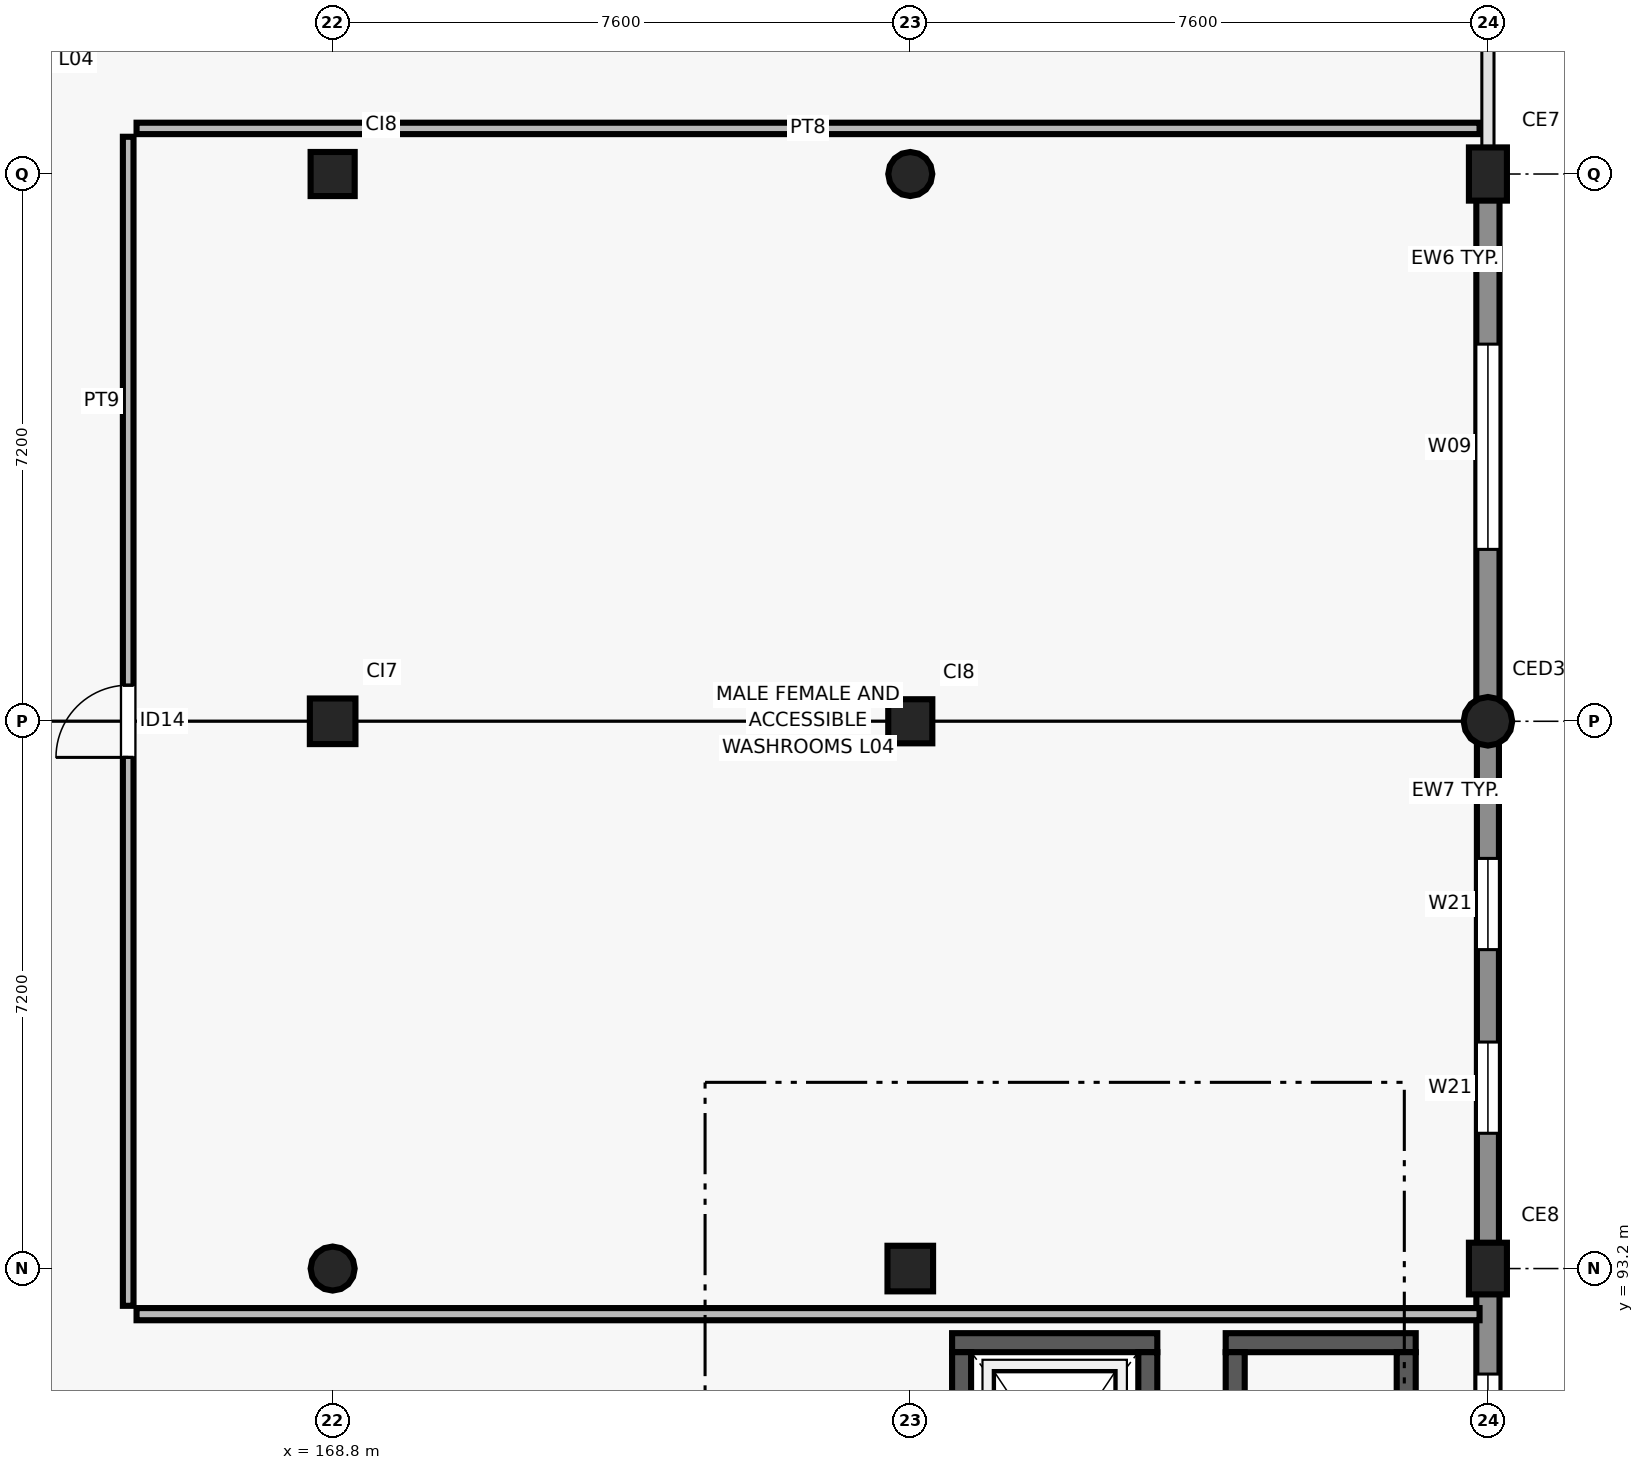
"""IFC4 building model, lengths in metres.
Left out: names, types, materials, properties, quantities, classifications, styles, units other than length and angle.
Written with IfcOpenShell. Run it as: python <this file> out.ifc"""

import sys

from ifc_helpers import new_model, si_unit, direction, frame, frame_2d, origin, origin_2d, place, context, subcontext, project, spatial, rectangle, circle, extrude, element, fill, save


model = new_model("IFC4")
c1 = context("Model", 3, precision=1e-05, world=origin(), true_north=direction((0.0, 1.0)))
c2 = subcontext(c1, "Body", "Model", "MODEL_VIEW")
j1 = project(units=[si_unit("LENGTHUNIT", "METRE"), si_unit("PLANEANGLEUNIT", "RADIAN")], contexts=[c1])
p1 = place(None, origin())
s1 = spatial("IfcSite", under=j1, at=p1, CompositionType="ELEMENT")
p2 = place(p1, origin())
s2 = spatial("IfcBuilding", under=s1, at=p2, CompositionType="ELEMENT")
p3 = place(p2, frame((0.0, 0.0, 17.4)))
s3 = spatial("IfcBuildingStorey", under=s2, at=p3, CompositionType="ELEMENT", Elevation=17.4)
p4 = place(p3, frame((168.8, 93.2, 0.0), z_axis=(0.0, 0.0, 1.0), x_axis=(1.0, 0.0, 0.0)))
e1 = element("IfcColumn", 1, at=p4, inside=s3, PredefinedType="COLUMN", context=c2, shape_type="SweptSolid", body=[
    extrude(circle(Radius=0.29, at=origin_2d()), origin(), (0.0, 0.0, 1.0), 4.2),
])
p5 = place(p3, frame((168.8, 100.4, 0.0), z_axis=(0.0, 0.0, 1.0), x_axis=(1.0, 0.0, 0.0)))
e2 = element("IfcColumn", 2, at=p5, inside=s3, PredefinedType="COLUMN", context=c2, shape_type="SweptSolid", body=[
    extrude(rectangle(XDim=0.6, YDim=0.6, at=origin_2d()), origin(), (0.0, 0.0, 1.0), 4.2),
])
p6 = place(p3, frame((168.8, 107.6, 0.0), z_axis=(0.0, 0.0, 1.0), x_axis=(1.0, 0.0, 0.0)))
e3 = element("IfcColumn", 3, at=p6, inside=s3, PredefinedType="COLUMN", context=c2, shape_type="SweptSolid", body=[
    extrude(rectangle(XDim=0.58, YDim=0.58, at=origin_2d()), origin(), (0.0, 0.0, 1.0), 4.2),
])
p7 = place(p3, frame((176.4, 93.2, 0.0), z_axis=(0.0, 0.0, 1.0), x_axis=(1.0, 0.0, 0.0)))
e4 = element("IfcColumn", 4, at=p7, inside=s3, PredefinedType="COLUMN", context=c2, shape_type="SweptSolid", body=[
    extrude(rectangle(XDim=0.6, YDim=0.6, at=origin_2d()), origin(), (0.0, 0.0, 1.0), 4.2),
])
p8 = place(p3, frame((176.4, 100.4, 0.0), z_axis=(0.0, 0.0, 1.0), x_axis=(1.0, 0.0, 0.0)))
e5 = element("IfcColumn", 5, at=p8, inside=s3, PredefinedType="COLUMN", context=c2, shape_type="SweptSolid", body=[
    extrude(rectangle(XDim=0.58, YDim=0.58, at=origin_2d()), origin(), (0.0, 0.0, 1.0), 4.2),
])
p9 = place(p3, frame((176.4, 107.6, 0.0), z_axis=(0.0, 0.0, 1.0), x_axis=(1.0, 0.0, 0.0)))
e6 = element("IfcColumn", 6, at=p9, inside=s3, PredefinedType="COLUMN", context=c2, shape_type="SweptSolid", body=[
    extrude(circle(Radius=0.29, at=origin_2d()), origin(), (0.0, 0.0, 1.0), 4.2),
])
p10 = place(p3, frame((184.0, 93.2, 0.0), z_axis=(0.0, 0.0, 1.0), x_axis=(1.0, 0.0, 0.0)))
e7 = element("IfcColumn", 7, at=p10, inside=s3, PredefinedType="COLUMN", context=c2, shape_type="SweptSolid", body=[
    extrude(rectangle(XDim=0.68, YDim=0.5, at=origin_2d()), origin(), (0.0, 0.0, 1.0), 4.2),
])
p11 = place(p3, frame((184.0, 100.4, 0.0), z_axis=(0.0, 0.0, 1.0), x_axis=(1.0, 0.0, 0.0)))
e8 = element("IfcColumn", 8, at=p11, inside=s3, PredefinedType="COLUMN", context=c2, shape_type="SweptSolid", body=[
    extrude(circle(Radius=0.32, at=origin_2d()), origin(), (0.0, 0.0, 1.0), 4.2),
])
p12 = place(p3, frame((184.0, 107.6, 0.0), z_axis=(0.0, 0.0, 1.0), x_axis=(1.0, 0.0, 0.0)))
e9 = element("IfcColumn", 9, at=p12, inside=s3, PredefinedType="COLUMN", context=c2, shape_type="SweptSolid", body=[
    extrude(rectangle(XDim=0.7, YDim=0.5, at=origin_2d()), origin(), (0.0, 0.0, 1.0), 4.2),
])
p13 = place(p3, frame((184.0, 100.669, 0.0), z_axis=(0.0, 0.0, 1.0), x_axis=(0.0, 1.0, 0.0)))
e10 = element("IfcWall", 10, at=p13, inside=s3, PredefinedType="SOLIDWALL", context=c2, shape_type="SweptSolid", body=[
    extrude(rectangle(XDim=6.686, YDim=0.305, at=frame_2d((3.343, 0.0))), origin(), (0.0, 0.0, 1.0), 3.53),
])
p14 = place(p13, frame((1.993, 0.0, 0.9)))
e11 = element("IfcOpeningElement", 11, at=p14, cuts=e10, PredefinedType="OPENING", context=c2, shape_type="SweptSolid", body=[
    extrude(rectangle(XDim=2.7, YDim=1.5, at=frame_2d((1.35, 0.75))), frame((0.0, 0.162, 0.0), z_axis=(0.0, -1.0, 0.0), x_axis=(1.0, 0.0, 0.0)), (0.0, 0.0, 1.0), 0.325),
])
p15 = place(p3, frame((184.0, 86.245, 0.0), z_axis=(0.0, 0.0, 1.0), x_axis=(0.0, 1.0, 0.0)))
e12 = element("IfcWall", 12, at=p15, inside=s3, PredefinedType="SOLIDWALL", context=c2, shape_type="SweptSolid", body=[
    extrude(rectangle(XDim=6.71, YDim=0.305, at=frame_2d((3.355, 0.0))), origin(), (0.0, 0.0, 1.0), 3.45),
])
p16 = place(p15, frame((1.143, 0.0, 0.9)))
e13 = element("IfcOpeningElement", 13, at=p16, cuts=e12, PredefinedType="OPENING", context=c2, shape_type="SweptSolid", body=[
    extrude(rectangle(XDim=1.8, YDim=1.25, at=frame_2d((0.9, 0.625))), frame((0.0, 0.162, 0.0), z_axis=(0.0, -1.0, 0.0), x_axis=(1.0, 0.0, 0.0)), (0.0, 0.0, 1.0), 0.325),
])
p17 = place(p15, frame((3.767, 0.0, 0.9)))
e14 = element("IfcOpeningElement", 14, at=p17, cuts=e12, PredefinedType="OPENING", context=c2, shape_type="SweptSolid", body=[
    extrude(rectangle(XDim=1.8, YDim=1.25, at=frame_2d((0.9, 0.625))), frame((0.0, 0.162, 0.0), z_axis=(0.0, -1.0, 0.0), x_axis=(1.0, 0.0, 0.0)), (0.0, 0.0, 1.0), 0.325),
])
p18 = place(p3, frame((184.0, 93.445, 0.0), z_axis=(0.0, 0.0, 1.0), x_axis=(0.0, 1.0, 0.0)))
e15 = element("IfcWall", 15, at=p18, inside=s3, PredefinedType="SOLIDWALL", context=c2, shape_type="SweptSolid", body=[
    extrude(rectangle(XDim=6.686, YDim=0.29, at=frame_2d((3.343, 0.0))), origin(), (0.0, 0.0, 1.0), 3.51),
])
p19 = place(p18, frame((1.535, 0.0, 0.9)))
e16 = element("IfcOpeningElement", 16, at=p19, cuts=e15, PredefinedType="OPENING", context=c2, shape_type="SweptSolid", body=[
    extrude(rectangle(XDim=1.2, YDim=1.25, at=frame_2d((0.6, 0.625))), frame((0.0, 0.155, 0.0), z_axis=(0.0, -1.0, 0.0), x_axis=(1.0, 0.0, 0.0)), (0.0, 0.0, 1.0), 0.31),
])
p20 = place(p18, frame((3.951, 0.0, 0.9)))
e17 = element("IfcOpeningElement", 17, at=p20, cuts=e15, PredefinedType="OPENING", context=c2, shape_type="SweptSolid", body=[
    extrude(rectangle(XDim=1.2, YDim=1.25, at=frame_2d((0.6, 0.625))), frame((0.0, 0.155, 0.0), z_axis=(0.0, -1.0, 0.0), x_axis=(1.0, 0.0, 0.0)), (0.0, 0.0, 1.0), 0.31),
])
p21 = place(p3, frame((176.95, 92.225, 0.0), z_axis=(0.0, 0.0, 1.0), x_axis=(1.0, 0.0, 0.0)))
e18 = element("IfcWall", 18, at=p21, inside=s3, PredefinedType="SHEAR", context=c2, shape_type="SweptSolid", body=[
    extrude(rectangle(XDim=2.7, YDim=0.25, at=frame_2d((1.35, 0.0))), origin(), (0.0, 0.0, 1.0), 3.92),
])
for number, where, z_axis, x_axis in (
    (19, (177.075, 89.2, 0.0), (0.0, 0.0, 1.0), (0.0, 1.0, 0.0)),
    (20, (179.525, 89.2, 0.0), (0.0, 0.0, 1.0), (0.0, 1.0, 0.0)),
):
    element("IfcWall", number, at=place(p3, frame(where, z_axis=z_axis, x_axis=x_axis)), inside=s3, PredefinedType="SHEAR", context=c2, shape_type="SweptSolid", body=[
        extrude(rectangle(XDim=2.9, YDim=0.25, at=frame_2d((1.45, 0.0))), origin(), (0.0, 0.0, 1.0), 3.92),
    ])
p22 = place(p3, frame((180.55, 92.225, 0.0), z_axis=(0.0, 0.0, 1.0), x_axis=(1.0, 0.0, 0.0)))
e21 = element("IfcWall", 21, at=p22, inside=s3, PredefinedType="SHEAR", context=c2, shape_type="SweptSolid", body=[
    extrude(rectangle(XDim=2.5, YDim=0.25, at=frame_2d((1.25, 0.0))), origin(), (0.0, 0.0, 1.0), 3.92),
])
for number, where, z_axis, x_axis in (
    (22, (180.675, 89.2, 0.0), (0.0, 0.0, 1.0), (0.0, 1.0, 0.0)),
    (23, (182.925, 89.2, 0.0), (0.0, 0.0, 1.0), (0.0, 1.0, 0.0)),
):
    element("IfcWall", number, at=place(p3, frame(where, z_axis=z_axis, x_axis=x_axis)), inside=s3, PredefinedType="SHEAR", context=c2, shape_type="SweptSolid", body=[
        extrude(rectangle(XDim=2.9, YDim=0.25, at=frame_2d((1.45, 0.0))), origin(), (0.0, 0.0, 1.0), 3.92),
    ])
p23 = place(p3, frame((166.22, 92.6, 0.0), z_axis=(0.0, 0.0, 1.0), x_axis=(1.0, 0.0, 0.0)))
e24 = element("IfcWall", 24, at=p23, inside=s3, PredefinedType="PARTITIONING", context=c2, shape_type="SweptSolid", body=[
    extrude(rectangle(XDim=17.67, YDim=0.16, at=frame_2d((8.835, 0.0))), origin(), (0.0, 0.0, 1.0), 3.9),
])
p24 = place(p3, frame((166.22, 108.2, 0.0), z_axis=(0.0, 0.0, 1.0), x_axis=(1.0, 0.0, 0.0)))
e25 = element("IfcWall", 25, at=p24, inside=s3, PredefinedType="PARTITIONING", context=c2, shape_type="SweptSolid", body=[
    extrude(rectangle(XDim=17.67, YDim=0.15, at=frame_2d((8.835, 0.0))), origin(), (0.0, 0.0, 1.0), 3.9),
])
p25 = place(p3, frame((166.11, 92.71, 0.0), z_axis=(0.0, 0.0, 1.0), x_axis=(0.0, 1.0, 0.0)))
e26 = element("IfcWall", 26, at=p25, inside=s3, PredefinedType="PARTITIONING", context=c2, shape_type="SweptSolid", body=[
    extrude(rectangle(XDim=15.38, YDim=0.14, at=frame_2d((7.69, 0.0))), origin(), (0.0, 0.0, 1.0), 3.9),
])
p26 = place(p25, frame((7.215, 0.0, 0.0)))
e27 = element("IfcOpeningElement", 27, at=p26, cuts=e26, PredefinedType="OPENING", context=c2, shape_type="SweptSolid", body=[
    extrude(rectangle(XDim=0.95, YDim=2.1, at=frame_2d((0.475, 1.05))), frame((0.0, 0.08, 0.0), z_axis=(0.0, -1.0, 0.0), x_axis=(1.0, 0.0, 0.0)), (0.0, 0.0, 1.0), 0.16),
])
p27 = place(p14, origin())
e28 = element("IfcWindow", 28, at=p27, inside=s3, PartitioningType="SINGLE_PANEL", PredefinedType="WINDOW", context=c2, shape_type="SweptSolid", body=[
    extrude(rectangle(XDim=2.7, YDim=1.5, at=frame_2d((1.35, 0.75))), frame((0.0, 0.03, 0.0), z_axis=(0.0, -1.0, 0.0), x_axis=(1.0, 0.0, 0.0)), (0.0, 0.0, 1.0), 0.06),
])
fill(e11, e28)
p28 = place(p17, origin())
e29 = element("IfcWindow", 29, at=p28, inside=s3, PartitioningType="SINGLE_PANEL", PredefinedType="WINDOW", context=c2, shape_type="SweptSolid", body=[
    extrude(rectangle(XDim=1.8, YDim=1.25, at=frame_2d((0.9, 0.625))), frame((0.0, 0.03, 0.0), z_axis=(0.0, -1.0, 0.0), x_axis=(1.0, 0.0, 0.0)), (0.0, 0.0, 1.0), 0.06),
])
fill(e14, e29)
p29 = place(p19, origin())
e30 = element("IfcWindow", 30, at=p29, inside=s3, PartitioningType="SINGLE_PANEL", PredefinedType="WINDOW", context=c2, shape_type="SweptSolid", body=[
    extrude(rectangle(XDim=1.2, YDim=1.25, at=frame_2d((0.6, 0.625))), frame((0.0, 0.03, 0.0), z_axis=(0.0, -1.0, 0.0), x_axis=(1.0, 0.0, 0.0)), (0.0, 0.0, 1.0), 0.06),
])
fill(e16, e30)
p30 = place(p20, origin())
e31 = element("IfcWindow", 31, at=p30, inside=s3, PartitioningType="SINGLE_PANEL", PredefinedType="WINDOW", context=c2, shape_type="SweptSolid", body=[
    extrude(rectangle(XDim=1.2, YDim=1.25, at=frame_2d((0.6, 0.625))), frame((0.0, 0.03, 0.0), z_axis=(0.0, -1.0, 0.0), x_axis=(1.0, 0.0, 0.0)), (0.0, 0.0, 1.0), 0.06),
])
fill(e17, e31)
p31 = place(p26, origin())
e32 = element("IfcDoor", 32, at=p31, inside=s3, OperationType="SINGLE_SWING_LEFT", PredefinedType="DOOR", context=c2, shape_type="SweptSolid", body=[
    extrude(rectangle(XDim=0.95, YDim=2.1, at=frame_2d((0.475, 1.05))), frame((0.0, 0.025, 0.0), z_axis=(0.0, -1.0, 0.0), x_axis=(1.0, 0.0, 0.0)), (0.0, 0.0, 1.0), 0.05),
])
fill(e27, e32)
save(model, sys.argv[1])
